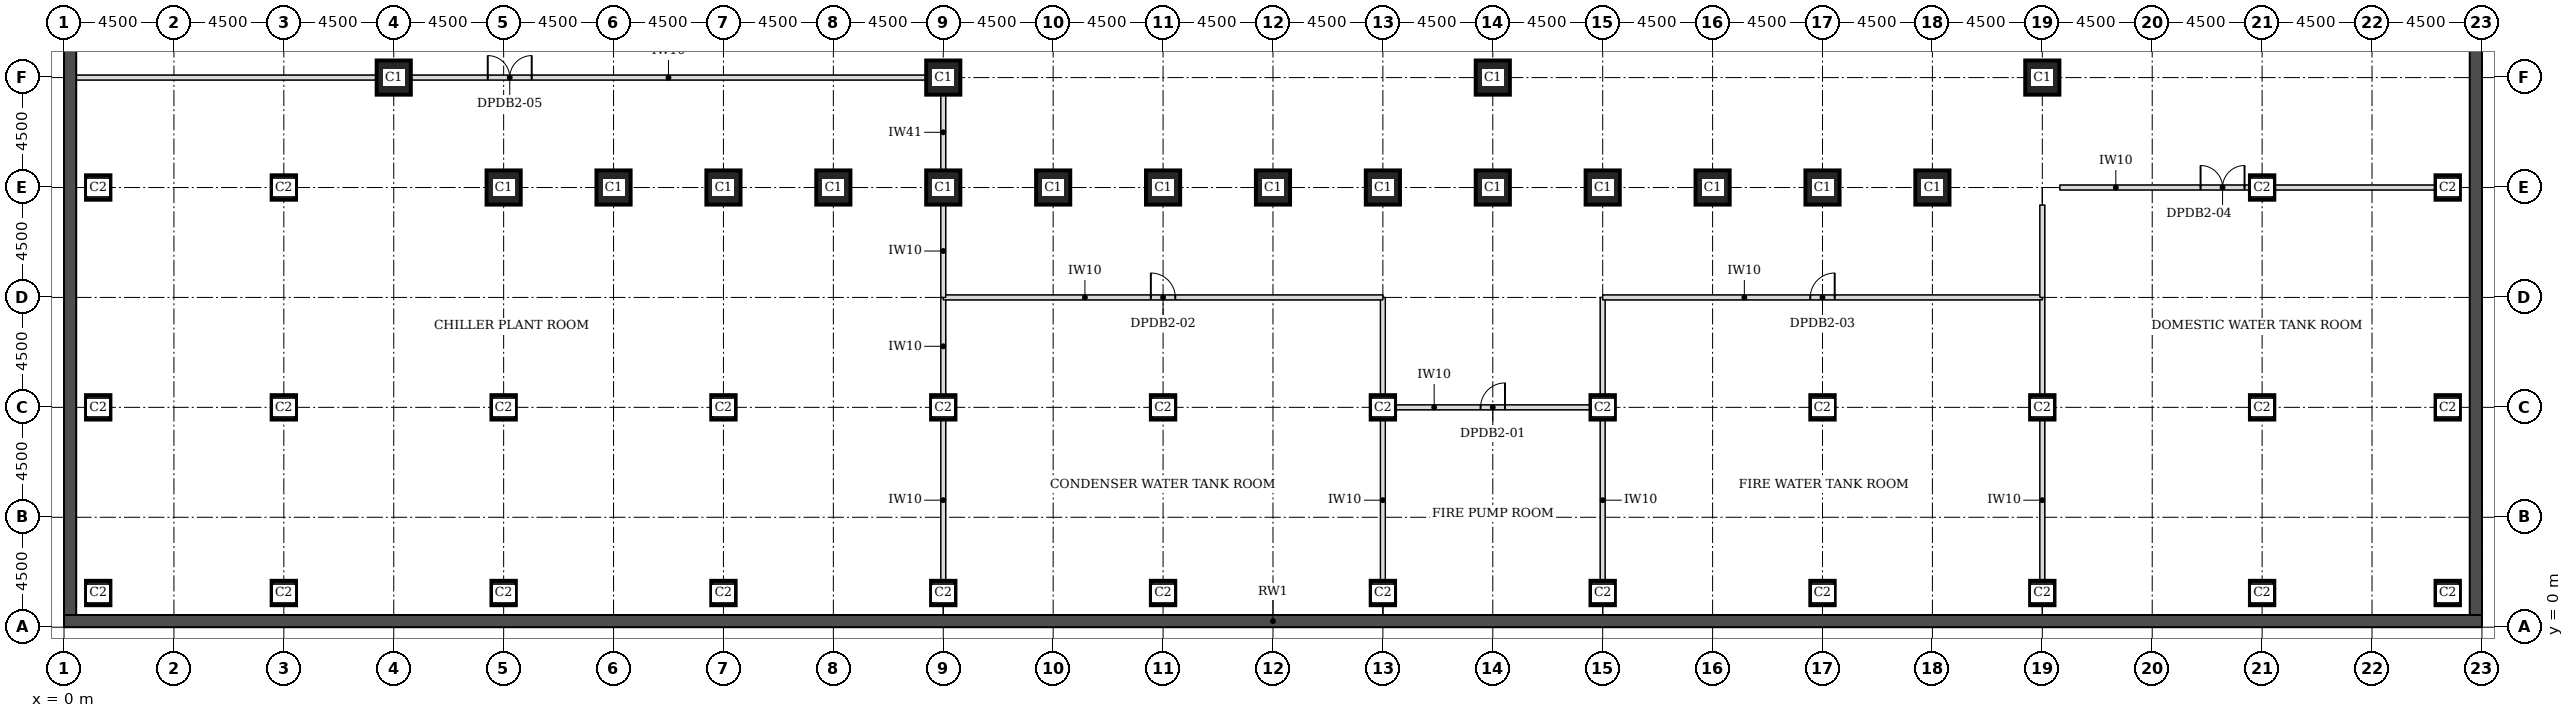
"""IFC4 building model, lengths in metres.
Left out: names, types, materials, properties, quantities, classifications, styles, units other than length and angle.
Written with IfcOpenShell. Run it as: python <this file> out.ifc"""

import sys

from ifc_helpers import new_model, si_unit, direction, frame, frame_2d, origin, origin_2d, place, context, subcontext, project, spatial, rectangle, extrude, element, fill, save


model = new_model("IFC4")
c1 = context("Model", 3, precision=1e-05, world=origin(), true_north=direction((0.0, 1.0)))
c2 = subcontext(c1, "Body", "Model", "MODEL_VIEW")
j1 = project(units=[si_unit("LENGTHUNIT", "METRE"), si_unit("PLANEANGLEUNIT", "RADIAN")], contexts=[c1])
p1 = place(None, origin())
s1 = spatial("IfcSite", under=j1, at=p1, CompositionType="ELEMENT")
p2 = place(p1, origin())
s2 = spatial("IfcBuilding", under=s1, at=p2, CompositionType="ELEMENT")
p3 = place(p2, frame((0.0, 0.0, -9.0)))
s3 = spatial("IfcBuildingStorey", under=s2, at=p3, CompositionType="ELEMENT", Elevation=-9.0)
p4 = place(p3, frame((0.0, 0.25, -0.4), z_axis=(0.0, 0.0, 1.0), x_axis=(1.0, 0.0, 0.0)))
e1 = element("IfcWall", 1, at=p4, inside=s3, PredefinedType="SOLIDWALL", context=c2, shape_type="SweptSolid", body=[
    extrude(rectangle(XDim=99.0, YDim=0.5, at=frame_2d((49.5, 0.0))), origin(), (0.0, 0.0, 1.0), 4.5),
])
for number, where, z_axis, x_axis in (
    (2, (0.25, 0.5, -0.4), (0.0, 0.0, 1.0), (0.0, 1.0, 0.0)),
    (3, (98.75, 0.5, -0.4), (0.0, 0.0, 1.0), (0.0, 1.0, 0.0)),
):
    element("IfcWall", number, at=place(p3, frame(where, z_axis=z_axis, x_axis=x_axis)), inside=s3, PredefinedType="SOLIDWALL", context=c2, shape_type="SweptSolid", body=[
        extrude(rectangle(XDim=93.5, YDim=0.5, at=frame_2d((46.75, 0.0))), origin(), (0.0, 0.0, 1.0), 4.5),
    ])
for number, where, z_axis, x_axis in (
    (4, (18.0, 18.0, 0.0), (0.0, 0.0, 1.0), (1.0, 0.0, 0.0)),
    (5, (22.5, 18.0, 0.0), (0.0, 0.0, 1.0), (1.0, 0.0, 0.0)),
    (6, (27.0, 18.0, 0.0), (0.0, 0.0, 1.0), (1.0, 0.0, 0.0)),
    (7, (31.5, 18.0, 0.0), (0.0, 0.0, 1.0), (1.0, 0.0, 0.0)),
    (8, (36.0, 18.0, 0.0), (0.0, 0.0, 1.0), (1.0, 0.0, 0.0)),
    (9, (40.5, 18.0, 0.0), (0.0, 0.0, 1.0), (1.0, 0.0, 0.0)),
    (10, (45.0, 18.0, 0.0), (0.0, 0.0, 1.0), (1.0, 0.0, 0.0)),
    (11, (49.5, 18.0, 0.0), (0.0, 0.0, 1.0), (1.0, 0.0, 0.0)),
    (12, (54.0, 18.0, 0.0), (0.0, 0.0, 1.0), (1.0, 0.0, 0.0)),
    (13, (58.5, 18.0, 0.0), (0.0, 0.0, 1.0), (1.0, 0.0, 0.0)),
    (14, (63.0, 18.0, 0.0), (0.0, 0.0, 1.0), (1.0, 0.0, 0.0)),
    (15, (67.5, 18.0, 0.0), (0.0, 0.0, 1.0), (1.0, 0.0, 0.0)),
    (16, (72.0, 18.0, 0.0), (0.0, 0.0, 1.0), (1.0, 0.0, 0.0)),
    (17, (76.5, 18.0, 0.0), (0.0, 0.0, 1.0), (1.0, 0.0, 0.0)),
    (18, (13.5, 22.5, 0.0), (0.0, 0.0, 1.0), (1.0, 0.0, 0.0)),
    (19, (36.0, 22.5, 0.0), (0.0, 0.0, 1.0), (1.0, 0.0, 0.0)),
    (20, (58.5, 22.5, 0.0), (0.0, 0.0, 1.0), (1.0, 0.0, 0.0)),
    (21, (81.0, 22.5, 0.0), (0.0, 0.0, 1.0), (1.0, 0.0, 0.0)),
):
    element("IfcColumn", number, at=place(p3, frame(where, z_axis=z_axis, x_axis=x_axis)), inside=s3, PredefinedType="COLUMN", context=c2, shape_type="SweptSolid", body=[
        extrude(rectangle(XDim=1.4, YDim=1.4, at=origin_2d()), origin(), (0.0, 0.0, 1.0), 4.5),
    ])
for number, where, z_axis, x_axis in (
    (22, (9.0, 9.0, -0.4), (0.0, 0.0, 1.0), (1.0, 0.0, 0.0)),
    (23, (9.0, 18.0, -0.4), (0.0, 0.0, 1.0), (1.0, 0.0, 0.0)),
    (24, (18.0, 9.0, -0.4), (0.0, 0.0, 1.0), (1.0, 0.0, 0.0)),
    (25, (27.0, 9.0, -0.4), (0.0, 0.0, 1.0), (1.0, 0.0, 0.0)),
    (26, (36.0, 9.0, -0.4), (0.0, 0.0, 1.0), (1.0, 0.0, 0.0)),
    (27, (45.0, 9.0, -0.4), (0.0, 0.0, 1.0), (1.0, 0.0, 0.0)),
    (28, (54.0, 9.0, -0.4), (0.0, 0.0, 1.0), (1.0, 0.0, 0.0)),
    (29, (63.0, 9.0, -0.4), (0.0, 0.0, 1.0), (1.0, 0.0, 0.0)),
    (30, (72.0, 9.0, -0.4), (0.0, 0.0, 1.0), (1.0, 0.0, 0.0)),
    (31, (81.0, 9.0, -0.4), (0.0, 0.0, 1.0), (1.0, 0.0, 0.0)),
    (32, (90.0, 9.0, -0.4), (0.0, 0.0, 1.0), (1.0, 0.0, 0.0)),
    (33, (90.0, 18.0, -0.4), (0.0, 0.0, 1.0), (1.0, 0.0, 0.0)),
    (34, (1.4, 1.4, -0.4), (0.0, 0.0, 1.0), (1.0, 0.0, 0.0)),
    (35, (9.0, 1.4, -0.4), (0.0, 0.0, 1.0), (1.0, 0.0, 0.0)),
    (36, (18.0, 1.4, -0.4), (0.0, 0.0, 1.0), (1.0, 0.0, 0.0)),
    (37, (27.0, 1.4, -0.4), (0.0, 0.0, 1.0), (1.0, 0.0, 0.0)),
    (38, (36.0, 1.4, -0.4), (0.0, 0.0, 1.0), (1.0, 0.0, 0.0)),
    (39, (45.0, 1.4, -0.4), (0.0, 0.0, 1.0), (1.0, 0.0, 0.0)),
    (40, (54.0, 1.4, -0.4), (0.0, 0.0, 1.0), (1.0, 0.0, 0.0)),
    (41, (63.0, 1.4, -0.4), (0.0, 0.0, 1.0), (1.0, 0.0, 0.0)),
    (42, (72.0, 1.4, -0.4), (0.0, 0.0, 1.0), (1.0, 0.0, 0.0)),
    (43, (81.0, 1.4, -0.4), (0.0, 0.0, 1.0), (1.0, 0.0, 0.0)),
    (44, (90.0, 1.4, -0.4), (0.0, 0.0, 1.0), (1.0, 0.0, 0.0)),
    (45, (97.6, 1.4, -0.4), (0.0, 0.0, 1.0), (1.0, 0.0, 0.0)),
    (46, (1.4, 9.0, -0.4), (0.0, 0.0, 1.0), (1.0, 0.0, 0.0)),
    (47, (97.6, 9.0, -0.4), (0.0, 0.0, 1.0), (1.0, 0.0, 0.0)),
    (48, (1.4, 18.0, -0.4), (0.0, 0.0, 1.0), (1.0, 0.0, 0.0)),
    (49, (97.6, 18.0, -0.4), (0.0, 0.0, 1.0), (1.0, 0.0, 0.0)),
):
    element("IfcColumn", number, at=place(p3, frame(where, z_axis=z_axis, x_axis=x_axis)), inside=s3, PredefinedType="COLUMN", context=c2, shape_type="SweptSolid", body=[
        extrude(rectangle(XDim=1.0, YDim=1.0, at=origin_2d()), origin(), (0.0, 0.0, 1.0), 4.9),
    ])
p5 = place(p3, frame((36.0, 1.9, 0.0), z_axis=(0.0, 0.0, 1.0), x_axis=(0.0, 1.0, 0.0)))
e50 = element("IfcWall", 50, at=p5, inside=s3, PredefinedType="PARTITIONING", context=c2, shape_type="SweptSolid", body=[
    extrude(rectangle(XDim=6.6, YDim=0.2, at=frame_2d((3.3, 0.0))), origin(), (0.0, 0.0, 1.0), 4.1),
])
p6 = place(p3, frame((36.0, 9.5, 0.0), z_axis=(0.0, 0.0, 1.0), x_axis=(0.0, 1.0, 0.0)))
e51 = element("IfcWall", 51, at=p6, inside=s3, PredefinedType="PARTITIONING", context=c2, shape_type="SweptSolid", body=[
    extrude(rectangle(XDim=4.0, YDim=0.2, at=frame_2d((2.0, 0.0))), origin(), (0.0, 0.0, 1.0), 4.1),
])
for number, where, z_axis, x_axis in (
    (52, (54.0, 1.9, 0.0), (0.0, 0.0, 1.0), (0.0, 1.0, 0.0)),
    (53, (63.0, 1.9, 0.0), (0.0, 0.0, 1.0), (0.0, 1.0, 0.0)),
    (54, (81.0, 1.9, 0.0), (0.0, 0.0, 1.0), (0.0, 1.0, 0.0)),
):
    element("IfcWall", number, at=place(p3, frame(where, z_axis=z_axis, x_axis=x_axis)), inside=s3, PredefinedType="PARTITIONING", context=c2, shape_type="SweptSolid", body=[
        extrude(rectangle(XDim=6.6, YDim=0.2, at=frame_2d((3.3, 0.0))), origin(), (0.0, 0.0, 1.0), 4.1),
    ])
p7 = place(p3, frame((81.0, 9.5, 0.0), z_axis=(0.0, 0.0, 1.0), x_axis=(0.0, 1.0, 0.0)))
e55 = element("IfcWall", 55, at=p7, inside=s3, PredefinedType="PARTITIONING", context=c2, shape_type="SweptSolid", body=[
    extrude(rectangle(XDim=4.0, YDim=0.2, at=frame_2d((2.0, 0.0))), origin(), (0.0, 0.0, 1.0), 4.1),
])
p8 = place(p3, frame((54.5, 9.0, 0.0), z_axis=(0.0, 0.0, 1.0), x_axis=(1.0, 0.0, 0.0)))
e56 = element("IfcWall", 56, at=p8, inside=s3, PredefinedType="PARTITIONING", context=c2, shape_type="SweptSolid", body=[
    extrude(rectangle(XDim=8.0, YDim=0.2, at=frame_2d((4.0, 0.0))), origin(), (0.0, 0.0, 1.0), 4.1),
])
p9 = place(p8, frame((3.5, 0.0, 0.0)))
e57 = element("IfcOpeningElement", 57, at=p9, cuts=e56, PredefinedType="OPENING", context=c2, shape_type="SweptSolid", body=[
    extrude(rectangle(XDim=1.0, YDim=2.1, at=frame_2d((0.5, 1.05))), frame((0.0, 0.11, 0.0), z_axis=(0.0, -1.0, 0.0), x_axis=(1.0, 0.0, 0.0)), (0.0, 0.0, 1.0), 0.22),
])
for number, where, z_axis, x_axis in (
    (58, (54.0, 9.5, 0.0), (0.0, 0.0, 1.0), (0.0, 1.0, 0.0)),
    (59, (63.0, 9.5, 0.0), (0.0, 0.0, 1.0), (0.0, 1.0, 0.0)),
):
    element("IfcWall", number, at=place(p3, frame(where, z_axis=z_axis, x_axis=x_axis)), inside=s3, PredefinedType="PARTITIONING", context=c2, shape_type="SweptSolid", body=[
        extrude(rectangle(XDim=4.0, YDim=0.2, at=frame_2d((2.0, 0.0))), origin(), (0.0, 0.0, 1.0), 4.1),
    ])
p10 = place(p3, frame((36.0, 13.5, 0.0), z_axis=(0.0, 0.0, 1.0), x_axis=(1.0, 0.0, 0.0)))
e60 = element("IfcWall", 60, at=p10, inside=s3, PredefinedType="PARTITIONING", context=c2, shape_type="SweptSolid", body=[
    extrude(rectangle(XDim=18.0, YDim=0.2, at=frame_2d((9.0, 0.0))), origin(), (0.0, 0.0, 1.0), 4.1),
])
p11 = place(p10, frame((8.5, 0.0, 0.0)))
e61 = element("IfcOpeningElement", 61, at=p11, cuts=e60, PredefinedType="OPENING", context=c2, shape_type="SweptSolid", body=[
    extrude(rectangle(XDim=1.0, YDim=2.1, at=frame_2d((0.5, 1.05))), frame((0.0, 0.11, 0.0), z_axis=(0.0, -1.0, 0.0), x_axis=(1.0, 0.0, 0.0)), (0.0, 0.0, 1.0), 0.22),
])
p12 = place(p3, frame((36.0, 13.5, 0.0), z_axis=(0.0, 0.0, 1.0), x_axis=(0.0, 1.0, 0.0)))
e62 = element("IfcWall", 62, at=p12, inside=s3, PredefinedType="PARTITIONING", context=c2, shape_type="SweptSolid", body=[
    extrude(rectangle(XDim=3.8, YDim=0.2, at=frame_2d((1.9, 0.0))), origin(), (0.0, 0.0, 1.0), 4.1),
])
p13 = place(p3, frame((36.0, 18.7, 0.0), z_axis=(0.0, 0.0, 1.0), x_axis=(0.0, 1.0, 0.0)))
e63 = element("IfcWall", 63, at=p13, inside=s3, PredefinedType="PARTITIONING", context=c2, shape_type="SweptSolid", body=[
    extrude(rectangle(XDim=3.12, YDim=0.2, at=frame_2d((1.56, 0.0))), origin(), (0.0, 0.0, 1.0), 3.1),
])
p14 = place(p3, frame((63.0, 13.5, 0.0), z_axis=(0.0, 0.0, 1.0), x_axis=(1.0, 0.0, 0.0)))
e64 = element("IfcWall", 64, at=p14, inside=s3, PredefinedType="PARTITIONING", context=c2, shape_type="SweptSolid", body=[
    extrude(rectangle(XDim=18.0, YDim=0.2, at=frame_2d((9.0, 0.0))), origin(), (0.0, 0.0, 1.0), 4.1),
])
p15 = place(p14, frame((8.5, 0.0, 0.0)))
e65 = element("IfcOpeningElement", 65, at=p15, cuts=e64, PredefinedType="OPENING", context=c2, shape_type="SweptSolid", body=[
    extrude(rectangle(XDim=1.0, YDim=2.1, at=frame_2d((0.5, 1.05))), frame((0.0, 0.11, 0.0), z_axis=(0.0, -1.0, 0.0), x_axis=(1.0, 0.0, 0.0)), (0.0, 0.0, 1.0), 0.22),
])
p16 = place(p3, frame((81.0, 13.5, 0.0), z_axis=(0.0, 0.0, 1.0), x_axis=(0.0, 1.0, 0.0)))
e66 = element("IfcWall", 66, at=p16, inside=s3, PredefinedType="PARTITIONING", context=c2, shape_type="SweptSolid", body=[
    extrude(rectangle(XDim=3.78, YDim=0.2, at=frame_2d((1.89, 0.0))), origin(), (0.0, 0.0, 1.0), 4.1),
])
p17 = place(p3, frame((81.72, 18.0, 0.0), z_axis=(0.0, 0.0, 1.0), x_axis=(1.0, 0.0, 0.0)))
e67 = element("IfcWall", 67, at=p17, inside=s3, PredefinedType="PARTITIONING", context=c2, shape_type="SweptSolid", body=[
    extrude(rectangle(XDim=7.78, YDim=0.2, at=frame_2d((3.89, 0.0))), origin(), (0.0, 0.0, 1.0), 4.1),
])
p18 = place(p17, frame((5.76, 0.0, 0.0)))
e68 = element("IfcOpeningElement", 68, at=p18, cuts=e67, PredefinedType="OPENING", context=c2, shape_type="SweptSolid", body=[
    extrude(rectangle(XDim=1.8, YDim=2.1, at=frame_2d((0.9, 1.05))), frame((0.0, 0.11, 0.0), z_axis=(0.0, -1.0, 0.0), x_axis=(1.0, 0.0, 0.0)), (0.0, 0.0, 1.0), 0.22),
])
p19 = place(p3, frame((90.5, 18.0, 0.0), z_axis=(0.0, 0.0, 1.0), x_axis=(1.0, 0.0, 0.0)))
e69 = element("IfcWall", 69, at=p19, inside=s3, PredefinedType="PARTITIONING", context=c2, shape_type="SweptSolid", body=[
    extrude(rectangle(XDim=6.6, YDim=0.2, at=frame_2d((3.3, 0.0))), origin(), (0.0, 0.0, 1.0), 4.1),
])
p20 = place(p3, frame((0.5, 22.5, 0.0), z_axis=(0.0, 0.0, 1.0), x_axis=(1.0, 0.0, 0.0)))
e70 = element("IfcWall", 70, at=p20, inside=s3, PredefinedType="PARTITIONING", context=c2, shape_type="SweptSolid", body=[
    extrude(rectangle(XDim=12.3, YDim=0.2, at=frame_2d((6.15, 0.0))), origin(), (0.0, 0.0, 1.0), 4.1),
])
p21 = place(p3, frame((14.2, 22.5, 0.0), z_axis=(0.0, 0.0, 1.0), x_axis=(1.0, 0.0, 0.0)))
e71 = element("IfcWall", 71, at=p21, inside=s3, PredefinedType="PARTITIONING", context=c2, shape_type="SweptSolid", body=[
    extrude(rectangle(XDim=21.1, YDim=0.2, at=frame_2d((10.55, 0.0))), origin(), (0.0, 0.0, 1.0), 4.1),
])
p22 = place(p21, frame((3.15, 0.0, 0.0)))
e72 = element("IfcOpeningElement", 72, at=p22, cuts=e71, PredefinedType="OPENING", context=c2, shape_type="SweptSolid", body=[
    extrude(rectangle(XDim=1.8, YDim=2.1, at=frame_2d((0.9, 1.05))), frame((0.0, 0.11, 0.0), z_axis=(0.0, -1.0, 0.0), x_axis=(1.0, 0.0, 0.0)), (0.0, 0.0, 1.0), 0.22),
])
p23 = place(p22, origin())
e73 = element("IfcDoor", 73, at=p23, inside=s3, OperationType="DOUBLE_DOOR_SINGLE_SWING", PredefinedType="DOOR", context=c2, shape_type="SweptSolid", body=[
    extrude(rectangle(XDim=1.8, YDim=2.1, at=frame_2d((0.9, 1.05))), frame((0.0, 0.025, 0.0), z_axis=(0.0, -1.0, 0.0), x_axis=(1.0, 0.0, 0.0)), (0.0, 0.0, 1.0), 0.05),
])
fill(e72, e73)
p24 = place(p11, origin())
e74 = element("IfcDoor", 74, at=p24, inside=s3, OperationType="SINGLE_SWING_LEFT", PredefinedType="DOOR", context=c2, shape_type="SweptSolid", body=[
    extrude(rectangle(XDim=1.0, YDim=2.1, at=frame_2d((0.5, 1.05))), frame((0.0, 0.025, 0.0), z_axis=(0.0, -1.0, 0.0), x_axis=(1.0, 0.0, 0.0)), (0.0, 0.0, 1.0), 0.05),
])
fill(e61, e74)
p25 = place(p9, origin())
e75 = element("IfcDoor", 75, at=p25, inside=s3, OperationType="SINGLE_SWING_RIGHT", PredefinedType="DOOR", context=c2, shape_type="SweptSolid", body=[
    extrude(rectangle(XDim=1.0, YDim=2.1, at=frame_2d((0.5, 1.05))), frame((0.0, 0.025, 0.0), z_axis=(0.0, -1.0, 0.0), x_axis=(1.0, 0.0, 0.0)), (0.0, 0.0, 1.0), 0.05),
])
fill(e57, e75)
p26 = place(p15, origin())
e76 = element("IfcDoor", 76, at=p26, inside=s3, OperationType="SINGLE_SWING_RIGHT", PredefinedType="DOOR", context=c2, shape_type="SweptSolid", body=[
    extrude(rectangle(XDim=1.0, YDim=2.1, at=frame_2d((0.5, 1.05))), frame((0.0, 0.025, 0.0), z_axis=(0.0, -1.0, 0.0), x_axis=(1.0, 0.0, 0.0)), (0.0, 0.0, 1.0), 0.05),
])
fill(e65, e76)
p27 = place(p18, origin())
e77 = element("IfcDoor", 77, at=p27, inside=s3, OperationType="DOUBLE_DOOR_SINGLE_SWING", PredefinedType="DOOR", context=c2, shape_type="SweptSolid", body=[
    extrude(rectangle(XDim=1.8, YDim=2.1, at=frame_2d((0.9, 1.05))), frame((0.0, 0.025, 0.0), z_axis=(0.0, -1.0, 0.0), x_axis=(1.0, 0.0, 0.0)), (0.0, 0.0, 1.0), 0.05),
])
fill(e68, e77)
save(model, sys.argv[1])
